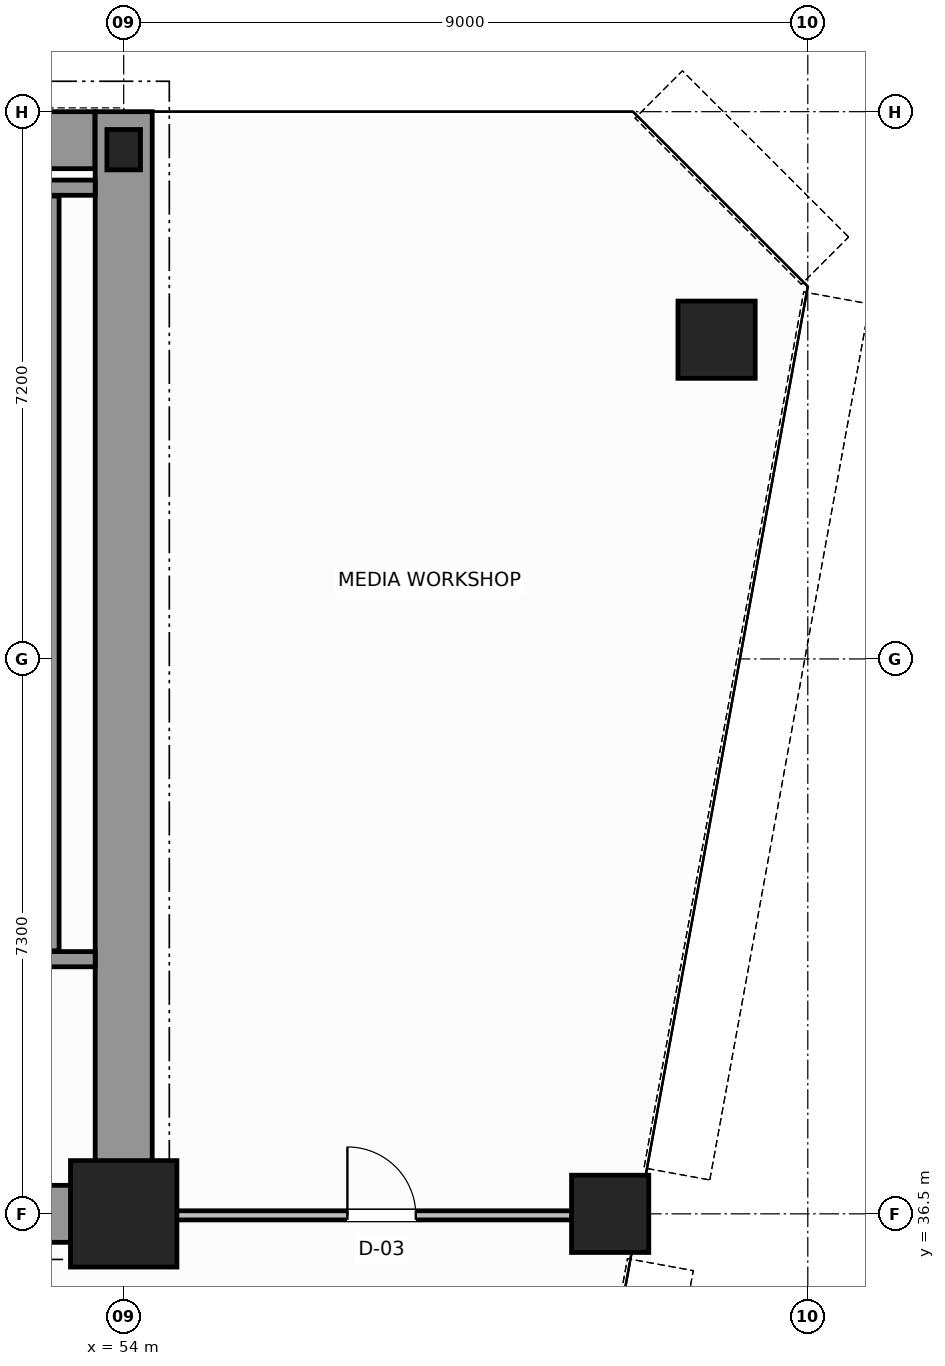
"""IFC4 building model, lengths in metres.
Left out: names, types, materials, properties, quantities, classifications, styles, units other than length and angle.
Written with IfcOpenShell. Run it as: python <this file> out.ifc"""

import sys

from ifc_helpers import new_model, si_unit, direction, frame, frame_2d, origin, origin_2d, place, context, subcontext, project, spatial, rectangle, hollow_circle, i_section, extrude, source, transform, mapped, element, fill, save


model = new_model("IFC4")
c1 = context("Model", 3, precision=1e-05, world=origin(), true_north=direction((0.0, 1.0)))
c2 = subcontext(c1, "Body", "Model", "MODEL_VIEW")
j1 = project(units=[si_unit("LENGTHUNIT", "METRE"), si_unit("PLANEANGLEUNIT", "RADIAN")], contexts=[c1])
p1 = place(None, origin())
s1 = spatial("IfcSite", under=j1, at=p1, CompositionType="ELEMENT")
p2 = place(p1, origin())
s2 = spatial("IfcBuilding", under=s1, at=p2, CompositionType="ELEMENT")
p3 = place(p2, frame((0.0, 0.0, 103.4)))
s3 = spatial("IfcBuildingStorey", under=s2, at=p3, CompositionType="ELEMENT", Elevation=103.4)
m1 = source(origin(), c2, "Body", "SweptSolid", [
    extrude(rectangle(XDim=1.4, YDim=1.4, at=origin_2d()), origin(), (0.0, 0.0, 1.0), 3.8),
])
p4 = place(p3, frame((54.0, 36.5, 0.0), z_axis=(0.0, 0.0, 1.0), x_axis=(1.0, 0.0, 0.0)))
e1 = element("IfcColumn", 1, at=p4, inside=s3, PredefinedType="COLUMN", context=c2, shape_type="MappedRepresentation", body=[
    mapped(m1, transform((0.0, 0.0, 0.0), scale=1.0)),
])
m2 = source(origin(), c2, "Body", "SweptSolid", [
    extrude(i_section(OverallWidth=0.442, OverallDepth=0.531, WebThickness=0.065, FlangeThickness=0.076, FilletRadius=0.015, at=origin_2d()), origin(), (0.0, 0.0, 1.0), 3.8),
])
p5 = place(p3, frame((54.0, 50.5, 0.0), z_axis=(0.0, 0.0, 1.0), x_axis=(1.0, 0.0, 0.0)))
e2 = element("IfcColumn", 2, at=p5, inside=s3, PredefinedType="COLUMN", context=c2, shape_type="MappedRepresentation", body=[
    mapped(m2, transform((0.0, 0.0, 0.0), scale=1.0)),
])
m3 = source(origin(), c2, "Body", "SweptSolid", [
    extrude(hollow_circle(Radius=0.508, WallThickness=0.045, at=origin_2d()), origin(), (0.0, 0.0, 1.0), 3.8),
])
for number, where, z_axis, x_axis in (
    (3, (61.8, 48.0, 0.0), (0.0, 0.0, 1.0), (1.0, 0.0, 0.0)),
    (4, (60.4, 36.5, 0.0), (0.0, 0.0, 1.0), (1.0, 0.0, 0.0)),
):
    element("IfcColumn", number, at=place(p3, frame(where, z_axis=z_axis, x_axis=x_axis)), inside=s3, PredefinedType="COLUMN", context=c2, shape_type="MappedRepresentation", body=[
        mapped(m3, transform((0.0, 0.0, 0.0), scale=1.0)),
    ])
p6 = place(p3, frame((34.002, 50.625, 0.0), z_axis=(0.0, 0.0, 1.0), x_axis=(1.0, 0.0, 0.0)))
e5 = element("IfcWall", 5, at=p6, inside=s3, PredefinedType="SHEAR", context=c2, shape_type="SweptSolid", body=[
    extrude(rectangle(XDim=19.619, YDim=0.75, at=frame_2d((9.81, 0.0))), origin(), (0.0, 0.0, 1.0), 3.8),
])
p7 = place(p3, frame((54.0, 36.5, 0.0), z_axis=(0.0, 0.0, 1.0), x_axis=(0.0, 1.0, 0.0)))
e6 = element("IfcWall", 6, at=p7, inside=s3, PredefinedType="SHEAR", context=c2, shape_type="SweptSolid", body=[
    extrude(rectangle(XDim=14.5, YDim=0.75, at=frame_2d((7.25, 0.0))), origin(), (0.0, 0.0, 1.0), 3.8),
])
p8 = place(p3, frame((49.8, 36.5, 0.0), z_axis=(0.0, 0.0, 1.0), x_axis=(1.0, 0.0, 0.0)))
e7 = element("IfcWall", 7, at=p8, inside=s3, PredefinedType="SHEAR", context=c2, shape_type="SweptSolid", body=[
    extrude(rectangle(XDim=3.805, YDim=0.75, at=frame_2d((1.902, 0.0))), origin(), (0.0, 0.0, 1.0), 2.38),
])
p9 = place(p3, frame((49.4, 39.85, 0.0), z_axis=(0.0, 0.0, 1.0), x_axis=(1.0, 0.0, 0.0)))
e8 = element("IfcWall", 8, at=p9, inside=s3, PredefinedType="SOLIDWALL", context=c2, shape_type="SweptSolid", body=[
    extrude(rectangle(XDim=4.225, YDim=0.2, at=frame_2d((2.113, 0.0))), origin(), (0.0, 0.0, 1.0), 3.8),
])
p10 = place(p9, frame((1.325, 0.0, 0.0)))
e9 = element("IfcOpeningElement", 9, at=p10, cuts=e8, PredefinedType="OPENING", context=c2, shape_type="SweptSolid", body=[
    extrude(rectangle(XDim=1.1, YDim=2.15, at=frame_2d((0.55, 1.075))), frame((0.0, 0.11, 0.0), z_axis=(0.0, -1.0, 0.0), x_axis=(1.0, 0.0, 0.0)), (0.0, 0.0, 1.0), 0.22),
])
p11 = place(p3, frame((49.4, 50.0, 0.0), z_axis=(0.0, 0.0, 1.0), x_axis=(1.0, 0.0, 0.0)))
e10 = element("IfcWall", 10, at=p11, inside=s3, PredefinedType="SOLIDWALL", context=c2, shape_type="SweptSolid", body=[
    extrude(rectangle(XDim=4.225, YDim=0.2, at=frame_2d((2.113, 0.0))), origin(), (0.0, 0.0, 1.0), 3.8),
])
p12 = place(p3, frame((53.05, 39.96, 0.0), z_axis=(0.0, 0.0, 1.0), x_axis=(0.0, 1.0, 0.0)))
e11 = element("IfcWall", 11, at=p12, inside=s3, PredefinedType="SOLIDWALL", context=c2, shape_type="SweptSolid", body=[
    extrude(rectangle(XDim=9.93, YDim=0.2, at=frame_2d((4.965, 0.0))), origin(), (0.0, 0.0, 1.0), 3.8),
])
p13 = place(p3, frame((54.06, 36.48, 0.0), z_axis=(0.0, 0.0, 1.0), x_axis=(1.0, 0.0, 0.0)))
e12 = element("IfcWall", 12, at=p13, inside=s3, PredefinedType="PARTITIONING", context=c2, shape_type="SweptSolid", body=[
    extrude(rectangle(XDim=6.666, YDim=0.12, at=frame_2d((3.333, 0.0))), origin(), (0.0, 0.0, 1.0), 2.87),
])
p14 = place(p13, frame((2.883, 0.0, 0.0)))
e13 = element("IfcOpeningElement", 13, at=p14, cuts=e12, PredefinedType="OPENING", context=c2, shape_type="SweptSolid", body=[
    extrude(rectangle(XDim=0.9, YDim=2.15, at=frame_2d((0.45, 1.075))), frame((0.0, 0.07, 0.0), z_axis=(0.0, -1.0, 0.0), x_axis=(1.0, 0.0, 0.0)), (0.0, 0.0, 1.0), 0.14),
])
m4 = source(origin(), c2, "Body", "SweptSolid", [
    extrude(rectangle(XDim=0.9, YDim=2.15, at=frame_2d((0.45, 1.075))), frame((0.0, 0.025, 0.0), z_axis=(0.0, -1.0, 0.0), x_axis=(1.0, 0.0, 0.0)), (0.0, 0.0, 1.0), 0.05),
])
p15 = place(p14, origin())
e14 = element("IfcDoor", 14, at=p15, inside=s3, OperationType="SINGLE_SWING_RIGHT", PredefinedType="DOOR", context=c2, shape_type="MappedRepresentation", body=[
    mapped(m4, transform((0.0, 0.0, 0.0), scale=1.0)),
])
fill(e13, e14)
save(model, sys.argv[1])
